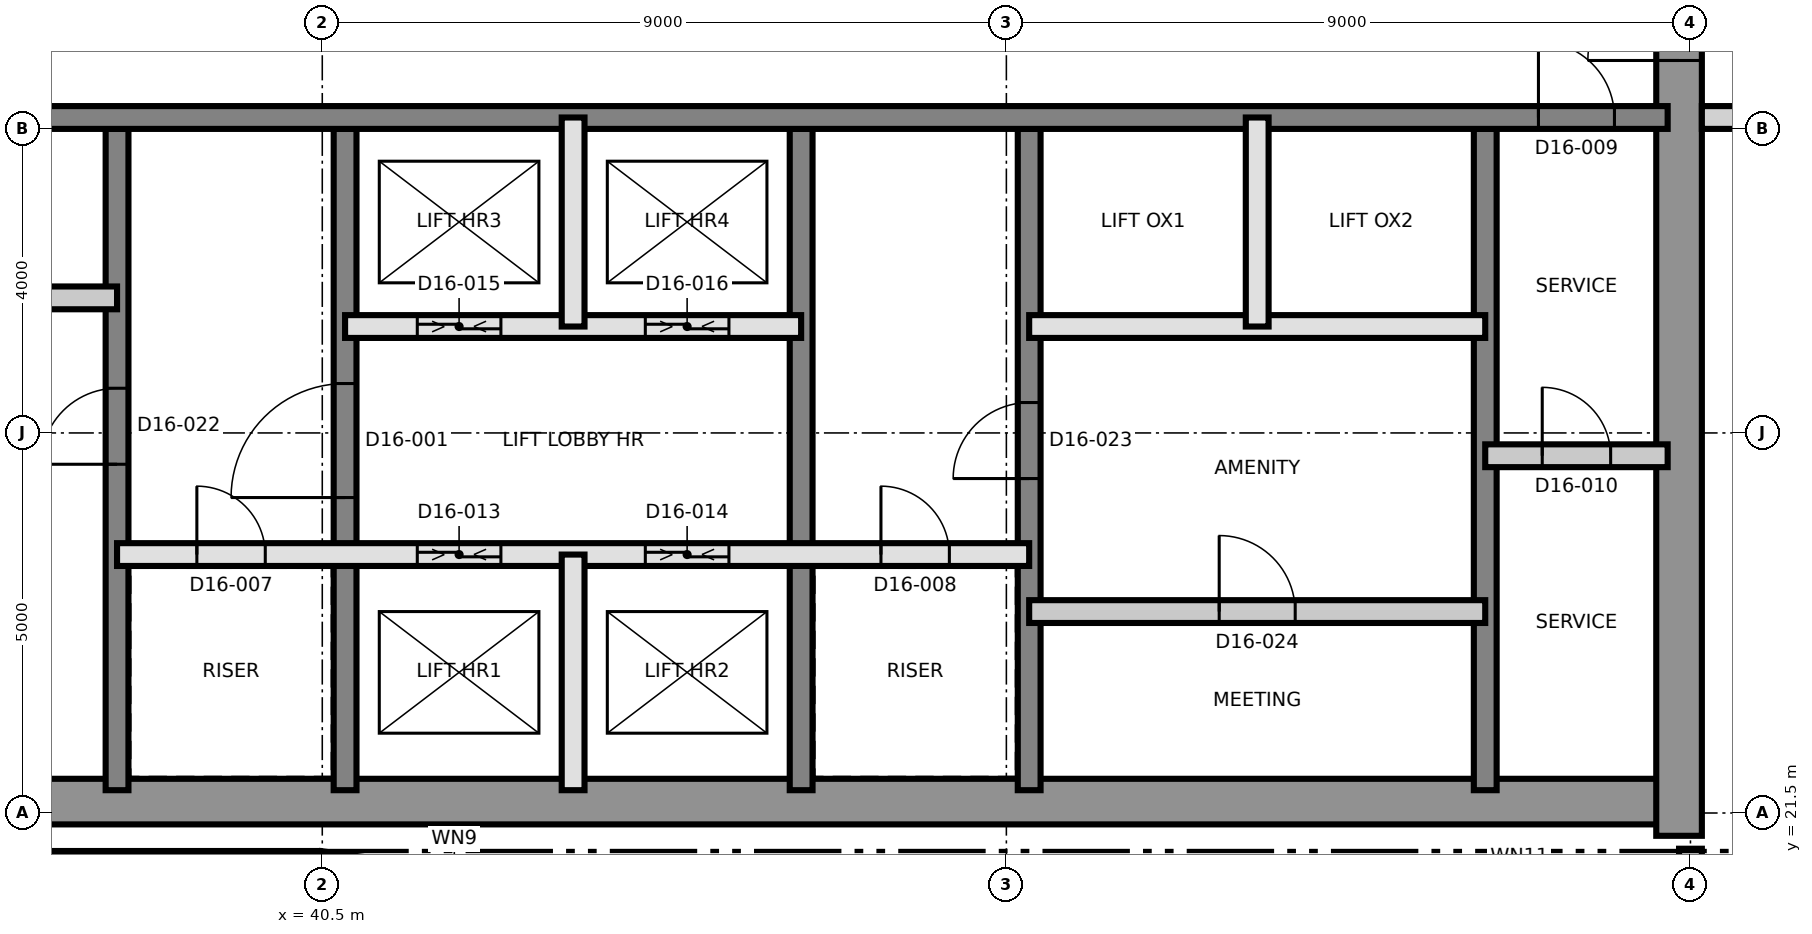
"""IFC4 building model, lengths in metres.
Left out: names, types, materials, properties, quantities, classifications, styles, units other than length and angle.
Written with IfcOpenShell. Run it as: python <this file> out.ifc"""

import sys

from ifc_helpers import new_model, si_unit, direction, frame, frame_2d, origin, place, context, subcontext, project, spatial, rectangle, extrude, element, fill, save


model = new_model("IFC4")
c1 = context("Model", 3, precision=1e-05, world=origin(), true_north=direction((0.0, 1.0)))
c2 = subcontext(c1, "Body", "Model", "MODEL_VIEW")
j1 = project(units=[si_unit("LENGTHUNIT", "METRE"), si_unit("PLANEANGLEUNIT", "RADIAN")], contexts=[c1])
p1 = place(None, origin())
s1 = spatial("IfcSite", under=j1, at=p1, CompositionType="ELEMENT")
p2 = place(p1, origin())
s2 = spatial("IfcBuilding", under=s1, at=p2, CompositionType="ELEMENT")
p3 = place(p2, frame((0.0, 0.0, 160.7)))
s3 = spatial("IfcBuildingStorey", under=s2, at=p3, CompositionType="ELEMENT", Elevation=160.7)
p4 = place(p3, frame((31.2, 21.65, 0.0), z_axis=(0.0, 0.0, 1.0), x_axis=(1.0, 0.0, 0.0)))
e1 = element("IfcWall", 1, at=p4, inside=s3, PredefinedType="SHEAR", context=c2, shape_type="SweptSolid", body=[
    extrude(rectangle(XDim=27.0, YDim=0.6, at=frame_2d((13.5, 0.0))), origin(), (0.0, 0.0, 1.0), 3.7),
])
p5 = place(p3, frame((58.35, 21.2, 0.0), z_axis=(0.0, 0.0, 1.0), x_axis=(0.0, 1.0, 0.0)))
e2 = element("IfcWall", 2, at=p5, inside=s3, PredefinedType="SHEAR", context=c2, shape_type="SweptSolid", body=[
    extrude(rectangle(XDim=18.6, YDim=0.6, at=frame_2d((9.3, 0.0))), origin(), (0.0, 0.0, 1.0), 3.7),
])
p6 = place(p5, frame((10.2, 0.0, 0.0)))
e3 = element("IfcOpeningElement", 3, at=p6, cuts=e2, PredefinedType="OPENING", context=c2, shape_type="SweptSolid", body=[
    extrude(rectangle(XDim=1.2, YDim=2.1, at=frame_2d((0.6, 1.05))), frame((0.0, 0.31, 0.0), z_axis=(0.0, -1.0, 0.0), x_axis=(1.0, 0.0, 0.0)), (0.0, 0.0, 1.0), 0.62),
])
p7 = place(p3, frame((37.8, 21.8, 0.0), z_axis=(0.0, 0.0, 1.0), x_axis=(0.0, 1.0, 0.0)))
e4 = element("IfcWall", 4, at=p7, inside=s3, PredefinedType="SHEAR", context=c2, shape_type="SweptSolid", body=[
    extrude(rectangle(XDim=8.7, YDim=0.3, at=frame_2d((4.35, 0.0))), origin(), (0.0, 0.0, 1.0), 3.7),
])
p8 = place(p7, frame((4.288, 0.0, 0.0)))
e5 = element("IfcOpeningElement", 5, at=p8, cuts=e4, PredefinedType="OPENING", context=c2, shape_type="SweptSolid", body=[
    extrude(rectangle(XDim=1.0, YDim=2.1, at=frame_2d((0.5, 1.05))), frame((0.0, 0.16, 0.0), z_axis=(0.0, -1.0, 0.0), x_axis=(1.0, 0.0, 0.0)), (0.0, 0.0, 1.0), 0.32),
])
p9 = place(p3, frame((40.8, 21.8, 0.0), z_axis=(0.0, 0.0, 1.0), x_axis=(0.0, 1.0, 0.0)))
e6 = element("IfcWall", 6, at=p9, inside=s3, PredefinedType="SHEAR", context=c2, shape_type="SweptSolid", body=[
    extrude(rectangle(XDim=8.7, YDim=0.3, at=frame_2d((4.35, 0.0))), origin(), (0.0, 0.0, 1.0), 3.7),
])
p10 = place(p9, frame((3.85, 0.0, 0.0)))
e7 = element("IfcOpeningElement", 7, at=p10, cuts=e6, PredefinedType="OPENING", context=c2, shape_type="SweptSolid", body=[
    extrude(rectangle(XDim=1.5, YDim=2.1, at=frame_2d((0.75, 1.05))), frame((0.0, 0.16, 0.0), z_axis=(0.0, -1.0, 0.0), x_axis=(1.0, 0.0, 0.0)), (0.0, 0.0, 1.0), 0.32),
])
p11 = place(p3, frame((46.8, 21.8, 0.0), z_axis=(0.0, 0.0, 1.0), x_axis=(0.0, 1.0, 0.0)))
e8 = element("IfcWall", 8, at=p11, inside=s3, PredefinedType="SHEAR", context=c2, shape_type="SweptSolid", body=[
    extrude(rectangle(XDim=8.7, YDim=0.3, at=frame_2d((4.35, 0.0))), origin(), (0.0, 0.0, 1.0), 3.7),
])
p12 = place(p3, frame((49.8, 21.8, 0.0), z_axis=(0.0, 0.0, 1.0), x_axis=(0.0, 1.0, 0.0)))
e9 = element("IfcWall", 9, at=p12, inside=s3, PredefinedType="SHEAR", context=c2, shape_type="SweptSolid", body=[
    extrude(rectangle(XDim=8.7, YDim=0.3, at=frame_2d((4.35, 0.0))), origin(), (0.0, 0.0, 1.0), 3.7),
])
p13 = place(p12, frame((4.1, 0.0, 0.0)))
e10 = element("IfcOpeningElement", 10, at=p13, cuts=e9, PredefinedType="OPENING", context=c2, shape_type="SweptSolid", body=[
    extrude(rectangle(XDim=1.0, YDim=2.1, at=frame_2d((0.5, 1.05))), frame((0.0, 0.16, 0.0), z_axis=(0.0, -1.0, 0.0), x_axis=(1.0, 0.0, 0.0)), (0.0, 0.0, 1.0), 0.32),
])
p14 = place(p3, frame((55.8, 21.8, 0.0), z_axis=(0.0, 0.0, 1.0), x_axis=(0.0, 1.0, 0.0)))
e11 = element("IfcWall", 11, at=p14, inside=s3, PredefinedType="SHEAR", context=c2, shape_type="SweptSolid", body=[
    extrude(rectangle(XDim=8.7, YDim=0.3, at=frame_2d((4.35, 0.0))), origin(), (0.0, 0.0, 1.0), 3.7),
])
p15 = place(p3, frame((31.8, 30.65, 0.0), z_axis=(0.0, 0.0, 1.0), x_axis=(1.0, 0.0, 0.0)))
e12 = element("IfcWall", 12, at=p15, inside=s3, PredefinedType="SHEAR", context=c2, shape_type="SweptSolid", body=[
    extrude(rectangle(XDim=26.4, YDim=0.3, at=frame_2d((13.2, 0.0))), origin(), (0.0, 0.0, 1.0), 3.7),
])
p16 = place(p15, frame((24.7, 0.0, 0.0)))
e13 = element("IfcOpeningElement", 13, at=p16, cuts=e12, PredefinedType="OPENING", context=c2, shape_type="SweptSolid", body=[
    extrude(rectangle(XDim=1.0, YDim=2.1, at=frame_2d((0.5, 1.05))), frame((0.0, 0.16, 0.0), z_axis=(0.0, -1.0, 0.0), x_axis=(1.0, 0.0, 0.0)), (0.0, 0.0, 1.0), 0.32),
])
p17 = place(p15, frame((4.0, 0.0, 0.0)))
e14 = element("IfcOpeningElement", 14, at=p17, cuts=e12, PredefinedType="OPENING", context=c2, shape_type="SweptSolid", body=[
    extrude(rectangle(XDim=1.0, YDim=2.1, at=frame_2d((0.5, 1.05))), frame((0.0, 0.16, 0.0), z_axis=(0.0, -1.0, 0.0), x_axis=(1.0, 0.0, 0.0)), (0.0, 0.0, 1.0), 0.32),
])
p18 = place(p3, frame((31.36, 20.85, 0.0), z_axis=(0.0, 0.0, 1.0), x_axis=(1.0, 0.0, 0.0)))
e15 = element("IfcWall", 15, at=p18, inside=s3, PredefinedType="SOLIDWALL", context=c2, shape_type="SweptSolid", body=[
    extrude(rectangle(XDim=9.094, YDim=0.3, at=frame_2d((4.547, 0.0))), origin(), (0.0, 0.0, 1.0), 3.4),
])
p19 = place(p3, frame((40.474, 20.849, 0.0), z_axis=(0.0, 0.0, 1.0), x_axis=(0.990778329255, -0.135492812649, 0.0)))
e16 = element("IfcWall", 16, at=p19, inside=s3, PredefinedType="SOLIDWALL", context=c2, shape_type="SweptSolid", body=[
    extrude(rectangle(XDim=3.559, YDim=0.3, at=frame_2d((1.779, 0.0))), origin(), (0.0, 0.0, 1.0), 3.4),
])
p20 = place(p19, frame((1.179, 0.0, 0.9)))
e17 = element("IfcOpeningElement", 17, at=p20, cuts=e16, PredefinedType="OPENING", context=c2, shape_type="SweptSolid", body=[
    extrude(rectangle(XDim=1.2, YDim=1.5, at=frame_2d((0.6, 0.75))), frame((0.0, 0.16, 0.0), z_axis=(0.0, -1.0, 0.0), x_axis=(1.0, 0.0, 0.0)), (0.0, 0.0, 1.0), 0.32),
])
p21 = place(p3, frame((49.8, 24.15, 0.0), z_axis=(0.0, 0.0, 1.0), x_axis=(1.0, 0.0, 0.0)))
e18 = element("IfcWall", 18, at=p21, inside=s3, PredefinedType="PARTITIONING", context=c2, shape_type="SweptSolid", body=[
    extrude(rectangle(XDim=6.0, YDim=0.3, at=frame_2d((3.0, 0.0))), origin(), (0.0, 0.0, 1.0), 3.4),
])
p22 = place(p21, frame((2.5, 0.0, 0.0)))
e19 = element("IfcOpeningElement", 19, at=p22, cuts=e18, PredefinedType="OPENING", context=c2, shape_type="SweptSolid", body=[
    extrude(rectangle(XDim=1.0, YDim=2.1, at=frame_2d((0.5, 1.05))), frame((0.0, 0.16, 0.0), z_axis=(0.0, -1.0, 0.0), x_axis=(1.0, 0.0, 0.0)), (0.0, 0.0, 1.0), 0.32),
])
p23 = place(p3, frame((37.8, 24.9, 0.0), z_axis=(0.0, 0.0, 1.0), x_axis=(1.0, 0.0, 0.0)))
e20 = element("IfcWall", 20, at=p23, inside=s3, PredefinedType="SOLIDWALL", context=c2, shape_type="SweptSolid", body=[
    extrude(rectangle(XDim=12.0, YDim=0.3, at=frame_2d((6.0, 0.0))), origin(), (0.0, 0.0, 1.0), 3.4),
])
p24 = place(p23, frame((1.05, 0.0, 0.0)))
e21 = element("IfcOpeningElement", 21, at=p24, cuts=e20, PredefinedType="OPENING", context=c2, shape_type="SweptSolid", body=[
    extrude(rectangle(XDim=0.9, YDim=2.1, at=frame_2d((0.45, 1.05))), frame((0.0, 0.16, 0.0), z_axis=(0.0, -1.0, 0.0), x_axis=(1.0, 0.0, 0.0)), (0.0, 0.0, 1.0), 0.32),
])
p25 = place(p23, frame((10.05, 0.0, 0.0)))
e22 = element("IfcOpeningElement", 22, at=p25, cuts=e20, PredefinedType="OPENING", context=c2, shape_type="SweptSolid", body=[
    extrude(rectangle(XDim=0.9, YDim=2.1, at=frame_2d((0.45, 1.05))), frame((0.0, 0.16, 0.0), z_axis=(0.0, -1.0, 0.0), x_axis=(1.0, 0.0, 0.0)), (0.0, 0.0, 1.0), 0.32),
])
p26 = place(p23, frame((3.95, 0.0, 0.0)))
e23 = element("IfcOpeningElement", 23, at=p26, cuts=e20, PredefinedType="OPENING", context=c2, shape_type="SweptSolid", body=[
    extrude(rectangle(XDim=1.1, YDim=2.4, at=frame_2d((0.55, 1.2))), frame((0.0, 0.16, 0.0), z_axis=(0.0, -1.0, 0.0), x_axis=(1.0, 0.0, 0.0)), (0.0, 0.0, 1.0), 0.32),
])
p27 = place(p23, frame((6.95, 0.0, 0.0)))
e24 = element("IfcOpeningElement", 24, at=p27, cuts=e20, PredefinedType="OPENING", context=c2, shape_type="SweptSolid", body=[
    extrude(rectangle(XDim=1.1, YDim=2.4, at=frame_2d((0.55, 1.2))), frame((0.0, 0.16, 0.0), z_axis=(0.0, -1.0, 0.0), x_axis=(1.0, 0.0, 0.0)), (0.0, 0.0, 1.0), 0.32),
])
p28 = place(p3, frame((55.8, 26.2, 0.0), z_axis=(0.0, 0.0, 1.0), x_axis=(1.0, 0.0, 0.0)))
e25 = element("IfcWall", 25, at=p28, inside=s3, PredefinedType="PARTITIONING", context=c2, shape_type="SweptSolid", body=[
    extrude(rectangle(XDim=2.4, YDim=0.3, at=frame_2d((1.2, 0.0))), origin(), (0.0, 0.0, 1.0), 3.4),
])
p29 = place(p28, frame((0.75, 0.0, 0.0)))
e26 = element("IfcOpeningElement", 26, at=p29, cuts=e25, PredefinedType="OPENING", context=c2, shape_type="SweptSolid", body=[
    extrude(rectangle(XDim=0.9, YDim=2.1, at=frame_2d((0.45, 1.05))), frame((0.0, 0.16, 0.0), z_axis=(0.0, -1.0, 0.0), x_axis=(1.0, 0.0, 0.0)), (0.0, 0.0, 1.0), 0.32),
])
p30 = place(p3, frame((40.8, 27.9, 0.0), z_axis=(0.0, 0.0, 1.0), x_axis=(1.0, 0.0, 0.0)))
e27 = element("IfcWall", 27, at=p30, inside=s3, PredefinedType="SOLIDWALL", context=c2, shape_type="SweptSolid", body=[
    extrude(rectangle(XDim=6.0, YDim=0.3, at=frame_2d((3.0, 0.0))), origin(), (0.0, 0.0, 1.0), 3.4),
])
p31 = place(p30, frame((0.95, 0.0, 0.0)))
e28 = element("IfcOpeningElement", 28, at=p31, cuts=e27, PredefinedType="OPENING", context=c2, shape_type="SweptSolid", body=[
    extrude(rectangle(XDim=1.1, YDim=2.4, at=frame_2d((0.55, 1.2))), frame((0.0, 0.16, 0.0), z_axis=(0.0, -1.0, 0.0), x_axis=(1.0, 0.0, 0.0)), (0.0, 0.0, 1.0), 0.32),
])
p32 = place(p30, frame((3.95, 0.0, 0.0)))
e29 = element("IfcOpeningElement", 29, at=p32, cuts=e27, PredefinedType="OPENING", context=c2, shape_type="SweptSolid", body=[
    extrude(rectangle(XDim=1.1, YDim=2.4, at=frame_2d((0.55, 1.2))), frame((0.0, 0.16, 0.0), z_axis=(0.0, -1.0, 0.0), x_axis=(1.0, 0.0, 0.0)), (0.0, 0.0, 1.0), 0.32),
])
p33 = place(p3, frame((49.8, 27.9, 0.0), z_axis=(0.0, 0.0, 1.0), x_axis=(1.0, 0.0, 0.0)))
e30 = element("IfcWall", 30, at=p33, inside=s3, PredefinedType="SOLIDWALL", context=c2, shape_type="SweptSolid", body=[
    extrude(rectangle(XDim=6.0, YDim=0.3, at=frame_2d((3.0, 0.0))), origin(), (0.0, 0.0, 1.0), 3.4),
])
p34 = place(p3, frame((31.8, 28.277, 0.0), z_axis=(0.0, 0.0, 1.0), x_axis=(1.0, 0.0, 0.0)))
e31 = element("IfcWall", 31, at=p34, inside=s3, PredefinedType="PARTITIONING", context=c2, shape_type="SweptSolid", body=[
    extrude(rectangle(XDim=6.0, YDim=0.3, at=frame_2d((3.0, 0.0))), origin(), (0.0, 0.0, 1.0), 3.4),
])
p35 = place(p3, frame((43.8, 21.8, 0.0), z_axis=(0.0, 0.0, 1.0), x_axis=(0.0, 1.0, 0.0)))
e32 = element("IfcWall", 32, at=p35, inside=s3, PredefinedType="SOLIDWALL", context=c2, shape_type="SweptSolid", body=[
    extrude(rectangle(XDim=3.1, YDim=0.3, at=frame_2d((1.55, 0.0))), origin(), (0.0, 0.0, 1.0), 3.4),
])
for number, where, z_axis, x_axis in (
    (33, (43.8, 27.9, 0.0), (0.0, 0.0, 1.0), (0.0, 1.0, 0.0)),
    (34, (52.8, 27.9, 0.0), (0.0, 0.0, 1.0), (0.0, 1.0, 0.0)),
):
    element("IfcWall", number, at=place(p3, frame(where, z_axis=z_axis, x_axis=x_axis)), inside=s3, PredefinedType="SOLIDWALL", context=c2, shape_type="SweptSolid", body=[
        extrude(rectangle(XDim=2.75, YDim=0.3, at=frame_2d((1.375, 0.0))), origin(), (0.0, 0.0, 1.0), 3.4),
    ])
p36 = place(p3, frame((58.65, 30.65, 0.0), z_axis=(0.0, 0.0, 1.0), x_axis=(1.0, 0.0, 0.0)))
e35 = element("IfcWall", 35, at=p36, inside=s3, PredefinedType="PARTITIONING", context=c2, shape_type="SweptSolid", body=[
    extrude(rectangle(XDim=8.5, YDim=0.3, at=frame_2d((4.25, 0.0))), origin(), (0.0, 0.0, 1.0), 3.4),
])
p37 = place(p36, frame((0.919, 0.0, 0.0)))
e36 = element("IfcOpeningElement", 36, at=p37, cuts=e35, PredefinedType="OPENING", context=c2, shape_type="SweptSolid", body=[
    extrude(rectangle(XDim=1.2, YDim=2.1, at=frame_2d((0.6, 1.05))), frame((0.0, 0.16, 0.0), z_axis=(0.0, -1.0, 0.0), x_axis=(1.0, 0.0, 0.0)), (0.0, 0.0, 1.0), 0.32),
])
p38 = place(p36, frame((3.969, 0.0, 0.0)))
e37 = element("IfcOpeningElement", 37, at=p38, cuts=e35, PredefinedType="OPENING", context=c2, shape_type="SweptSolid", body=[
    extrude(rectangle(XDim=1.0, YDim=2.1, at=frame_2d((0.5, 1.05))), frame((0.0, 0.16, 0.0), z_axis=(0.0, -1.0, 0.0), x_axis=(1.0, 0.0, 0.0)), (0.0, 0.0, 1.0), 0.32),
])
p39 = place(p3, frame((58.5, 20.565, 0.0), z_axis=(0.0, 0.0, 1.0), x_axis=(0.0, 1.0, 0.0)))
e38 = element("IfcWall", 38, at=p39, inside=s3, PredefinedType="PARTITIONING", context=c2, shape_type="SweptSolid", body=[
    extrude(rectangle(XDim=0.465, YDim=0.3, at=frame_2d((0.232, 0.0))), origin(), (0.0, 0.0, 1.0), 3.4),
])
p40 = place(p10, origin())
e39 = element("IfcDoor", 39, at=p40, inside=s3, OperationType="SINGLE_SWING_RIGHT", PredefinedType="DOOR", context=c2, shape_type="SweptSolid", body=[
    extrude(rectangle(XDim=1.5, YDim=2.1, at=frame_2d((0.75, 1.05))), frame((0.0, 0.025, 0.0), z_axis=(0.0, -1.0, 0.0), x_axis=(1.0, 0.0, 0.0)), (0.0, 0.0, 1.0), 0.05),
])
fill(e7, e39)
p41 = place(p24, origin())
e40 = element("IfcDoor", 40, at=p41, inside=s3, OperationType="SINGLE_SWING_LEFT", PredefinedType="DOOR", context=c2, shape_type="SweptSolid", body=[
    extrude(rectangle(XDim=0.9, YDim=2.1, at=frame_2d((0.45, 1.05))), frame((0.0, 0.025, 0.0), z_axis=(0.0, -1.0, 0.0), x_axis=(1.0, 0.0, 0.0)), (0.0, 0.0, 1.0), 0.05),
])
fill(e21, e40)
p42 = place(p25, origin())
e41 = element("IfcDoor", 41, at=p42, inside=s3, OperationType="SINGLE_SWING_RIGHT", PredefinedType="DOOR", context=c2, shape_type="SweptSolid", body=[
    extrude(rectangle(XDim=0.9, YDim=2.1, at=frame_2d((0.45, 1.05))), frame((0.0, 0.025, 0.0), z_axis=(0.0, -1.0, 0.0), x_axis=(1.0, 0.0, 0.0)), (0.0, 0.0, 1.0), 0.05),
])
fill(e22, e41)
p43 = place(p16, origin())
e42 = element("IfcDoor", 42, at=p43, inside=s3, OperationType="SINGLE_SWING_LEFT", PredefinedType="DOOR", context=c2, shape_type="SweptSolid", body=[
    extrude(rectangle(XDim=1.0, YDim=2.1, at=frame_2d((0.5, 1.05))), frame((0.0, 0.025, 0.0), z_axis=(0.0, -1.0, 0.0), x_axis=(1.0, 0.0, 0.0)), (0.0, 0.0, 1.0), 0.05),
])
fill(e13, e42)
p44 = place(p29, origin())
e43 = element("IfcDoor", 43, at=p44, inside=s3, OperationType="SINGLE_SWING_RIGHT", PredefinedType="DOOR", context=c2, shape_type="SweptSolid", body=[
    extrude(rectangle(XDim=0.9, YDim=2.1, at=frame_2d((0.45, 1.05))), frame((0.0, 0.025, 0.0), z_axis=(0.0, -1.0, 0.0), x_axis=(1.0, 0.0, 0.0)), (0.0, 0.0, 1.0), 0.05),
])
fill(e26, e43)
p45 = place(p6, origin())
e44 = element("IfcDoor", 44, at=p45, inside=s3, OperationType="SINGLE_SWING_LEFT", PredefinedType="DOOR", context=c2, shape_type="SweptSolid", body=[
    extrude(rectangle(XDim=1.2, YDim=2.1, at=frame_2d((0.6, 1.05))), frame((0.0, 0.025, 0.0), z_axis=(0.0, -1.0, 0.0), x_axis=(1.0, 0.0, 0.0)), (0.0, 0.0, 1.0), 0.05),
])
fill(e3, e44)
p46 = place(p26, origin())
e45 = element("IfcDoor", 45, at=p46, inside=s3, OperationType="SLIDING_TO_LEFT", PredefinedType="DOOR", context=c2, shape_type="SweptSolid", body=[
    extrude(rectangle(XDim=1.1, YDim=2.4, at=frame_2d((0.55, 1.2))), frame((0.0, 0.025, 0.0), z_axis=(0.0, -1.0, 0.0), x_axis=(1.0, 0.0, 0.0)), (0.0, 0.0, 1.0), 0.05),
])
fill(e23, e45)
p47 = place(p27, origin())
e46 = element("IfcDoor", 46, at=p47, inside=s3, OperationType="SLIDING_TO_LEFT", PredefinedType="DOOR", context=c2, shape_type="SweptSolid", body=[
    extrude(rectangle(XDim=1.1, YDim=2.4, at=frame_2d((0.55, 1.2))), frame((0.0, 0.025, 0.0), z_axis=(0.0, -1.0, 0.0), x_axis=(1.0, 0.0, 0.0)), (0.0, 0.0, 1.0), 0.05),
])
fill(e24, e46)
p48 = place(p31, origin())
e47 = element("IfcDoor", 47, at=p48, inside=s3, OperationType="SLIDING_TO_LEFT", PredefinedType="DOOR", context=c2, shape_type="SweptSolid", body=[
    extrude(rectangle(XDim=1.1, YDim=2.4, at=frame_2d((0.55, 1.2))), frame((0.0, 0.025, 0.0), z_axis=(0.0, -1.0, 0.0), x_axis=(1.0, 0.0, 0.0)), (0.0, 0.0, 1.0), 0.05),
])
fill(e28, e47)
p49 = place(p32, origin())
e48 = element("IfcDoor", 48, at=p49, inside=s3, OperationType="SLIDING_TO_LEFT", PredefinedType="DOOR", context=c2, shape_type="SweptSolid", body=[
    extrude(rectangle(XDim=1.1, YDim=2.4, at=frame_2d((0.55, 1.2))), frame((0.0, 0.025, 0.0), z_axis=(0.0, -1.0, 0.0), x_axis=(1.0, 0.0, 0.0)), (0.0, 0.0, 1.0), 0.05),
])
fill(e29, e48)
p50 = place(p8, origin())
e49 = element("IfcDoor", 49, at=p50, inside=s3, OperationType="SINGLE_SWING_RIGHT", PredefinedType="DOOR", context=c2, shape_type="SweptSolid", body=[
    extrude(rectangle(XDim=1.0, YDim=2.1, at=frame_2d((0.5, 1.05))), frame((0.0, 0.025, 0.0), z_axis=(0.0, -1.0, 0.0), x_axis=(1.0, 0.0, 0.0)), (0.0, 0.0, 1.0), 0.05),
])
fill(e5, e49)
p51 = place(p13, origin())
e50 = element("IfcDoor", 50, at=p51, inside=s3, OperationType="SINGLE_SWING_LEFT", PredefinedType="DOOR", context=c2, shape_type="SweptSolid", body=[
    extrude(rectangle(XDim=1.0, YDim=2.1, at=frame_2d((0.5, 1.05))), frame((0.0, 0.025, 0.0), z_axis=(0.0, -1.0, 0.0), x_axis=(1.0, 0.0, 0.0)), (0.0, 0.0, 1.0), 0.05),
])
fill(e10, e50)
p52 = place(p22, origin())
e51 = element("IfcDoor", 51, at=p52, inside=s3, OperationType="SINGLE_SWING_RIGHT", PredefinedType="DOOR", context=c2, shape_type="SweptSolid", body=[
    extrude(rectangle(XDim=1.0, YDim=2.1, at=frame_2d((0.5, 1.05))), frame((0.0, 0.025, 0.0), z_axis=(0.0, -1.0, 0.0), x_axis=(1.0, 0.0, 0.0)), (0.0, 0.0, 1.0), 0.05),
])
fill(e19, e51)
save(model, sys.argv[1])
